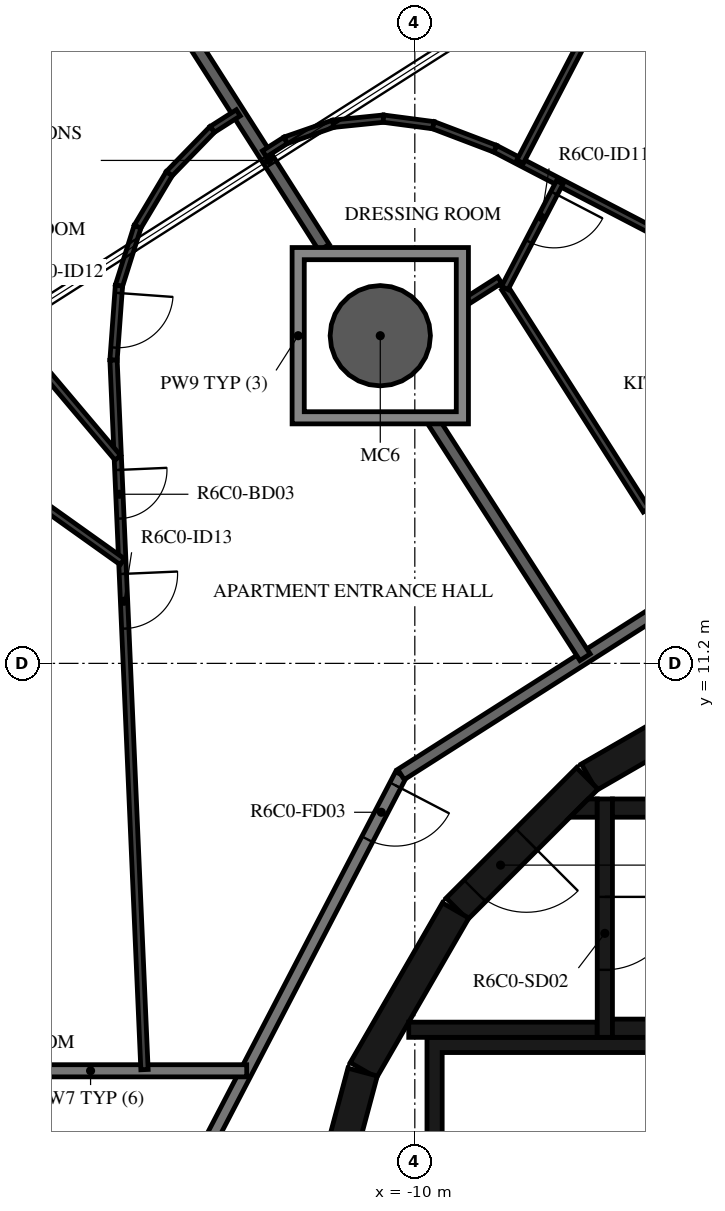
"""IFC4 building model, lengths in metres.
Left out: names, types, materials, properties, quantities, classifications, styles, units other than length and angle.
Written with IfcOpenShell. Run it as: python <this file> out.ifc"""

import sys

from ifc_helpers import new_model, si_unit, direction, frame, frame_2d, origin, origin_2d, place, context, subcontext, project, spatial, polyline, rectangle, hollow_circle, outline, extrude, element, fill, save


model = new_model("IFC4")
c1 = context("Model", 3, precision=1e-05, world=origin(), true_north=direction((0.0, 1.0)))
c2 = subcontext(c1, "Body", "Model", "MODEL_VIEW")
j1 = project(units=[si_unit("LENGTHUNIT", "METRE"), si_unit("PLANEANGLEUNIT", "RADIAN")], contexts=[c1])
p1 = place(None, origin())
s1 = spatial("IfcSite", under=j1, at=p1, CompositionType="ELEMENT")
p2 = place(p1, origin())
s2 = spatial("IfcBuilding", under=s1, at=p2, CompositionType="ELEMENT")
p3 = place(p2, frame((0.0, 0.0, 254.7)))
s3 = spatial("IfcBuildingStorey", under=s2, at=p3, CompositionType="ELEMENT", Elevation=254.7)
p4 = place(p3, frame((-10.568, 16.588, -0.38), z_axis=(0.0, 0.0, 1.0), x_axis=(1.0, 0.0, 0.0)))
e1 = element("IfcColumn", 1, at=p4, inside=s3, PredefinedType="COLUMN", context=c2, shape_type="SweptSolid", body=[
    extrude(hollow_circle(Radius=0.825, WallThickness=0.04, at=origin_2d()), origin(), (0.0, 0.0, 1.0), 2.616),
])
p5 = place(p3, frame((-4.51, 10.845, 0.0), z_axis=(0.0, 0.0, 1.0), x_axis=(-0.865975092491, -0.500087131594, 0.0)))
e2 = element("IfcWall", 2, at=p5, inside=s3, PredefinedType="SHEAR", context=c2, shape_type="SweptSolid", body=[
    extrude(rectangle(XDim=3.033, YDim=0.5, at=frame_2d((1.516, 0.0))), origin(), (0.0, 0.0, 1.0), 3.05),
])
p6 = place(p3, frame((-7.164, 9.308, 0.0), z_axis=(0.0, 0.0, 1.0), x_axis=(-0.707106781187, -0.707106781187, 0.0)))
e3 = element("IfcWall", 3, at=p6, inside=s3, PredefinedType="SHEAR", context=c2, shape_type="SweptSolid", body=[
    extrude(rectangle(XDim=3.032, YDim=0.5, at=frame_2d((1.516, 0.0))), origin(), (0.0, 0.0, 1.0), 3.05),
])
p7 = place(p6, frame((1.416, 0.0, 0.0)))
e4 = element("IfcOpeningElement", 4, at=p7, cuts=e3, PredefinedType="OPENING", context=c2, shape_type="SweptSolid", body=[
    extrude(rectangle(XDim=1.2, YDim=2.1, at=frame_2d((0.6, 1.05))), frame((0.0, 0.26, 0.0), z_axis=(0.0, -1.0, 0.0), x_axis=(1.0, 0.0, 0.0)), (0.0, 0.0, 1.0), 0.52),
])
for number, where, z_axis, x_axis in (
    (5, (-9.329, 7.137, 0.0), (0.0, 0.0, 1.0), (-0.5, -0.866, 0.0)),
    (6, (-10.858, 4.479, 0.0), (0.0, 0.0, 1.0), (-0.259, -0.966, 0.0)),
):
    element("IfcWall", number, at=place(p3, frame(where, z_axis=z_axis, x_axis=x_axis)), inside=s3, PredefinedType="SHEAR", context=c2, shape_type="SweptSolid", body=[
        extrude(rectangle(XDim=3.033, YDim=0.5, at=frame_2d((1.516, 0.0))), origin(), (0.0, 0.0, 1.0), 3.05),
    ])
for number, where, z_axis, x_axis in (
    (7, (-6.75, 5.2, 0.0), (0.0, 0.0, 1.0), (1.0, 0.0, 0.0)),
    (8, (-6.75, 8.82, 0.0), (0.0, 0.0, 1.0), (1.0, 0.0, 0.0)),
):
    element("IfcWall", number, at=place(p3, frame(where, z_axis=z_axis, x_axis=x_axis)), inside=s3, PredefinedType="SHEAR", context=c2, shape_type="SweptSolid", body=[
        extrude(rectangle(XDim=6.75, YDim=0.3, at=frame_2d((3.375, 0.0))), origin(), (0.0, 0.0, 1.0), 3.05),
    ])
p8 = place(p3, frame((-6.875, 8.97, 0.0), z_axis=(0.0, 0.0, 1.0), x_axis=(0.0, -1.0, 0.0)))
e9 = element("IfcWall", 9, at=p8, inside=s3, PredefinedType="SHEAR", context=c2, shape_type="SweptSolid", body=[
    extrude(rectangle(XDim=3.92, YDim=0.25, at=frame_2d((1.96, 0.0))), origin(), (0.0, 0.0, 1.0), 3.05),
])
p9 = place(p8, frame((1.61, 0.0, 0.0)))
e10 = element("IfcOpeningElement", 10, at=p9, cuts=e9, PredefinedType="OPENING", context=c2, shape_type="SweptSolid", body=[
    extrude(rectangle(XDim=1.2, YDim=2.1, at=frame_2d((0.6, 1.05))), frame((0.0, 0.135, 0.0), z_axis=(0.0, -1.0, 0.0), x_axis=(1.0, 0.0, 0.0)), (0.0, 0.0, 1.0), 0.27),
])
p10 = place(p3, frame((-7.0, 5.175, 0.0), z_axis=(0.0, 0.0, 1.0), x_axis=(-1.0, 0.0, 0.0)))
e11 = element("IfcWall", 11, at=p10, inside=s3, PredefinedType="SHEAR", context=c2, shape_type="SweptSolid", body=[
    extrude(rectangle(XDim=3.1, YDim=0.25, at=frame_2d((1.55, 0.0))), origin(), (0.0, 0.0, 1.0), 3.05),
])
p11 = place(p3, origin())
e12 = element("IfcWall", 12, at=p11, inside=s3, PredefinedType="SHEAR", context=c2, shape_type="SweptSolid", body=[
    extrude(outline(polyline([(-7.148, 8.97), (-7.0, 8.97), (-7.0, 8.67), (-7.448, 8.67), (-7.148, 8.97)])), origin(), (0.0, 0.0, 1.0), 3.05),
])
p12 = place(p3, origin())
e13 = element("IfcWall", 13, at=p12, inside=s3, PredefinedType="SHEAR", context=c2, shape_type="SweptSolid", body=[
    extrude(outline(polyline([(-9.55, 4.8), (-1.2, 4.8), (-1.2, 1.9), (-0.95, 1.9), (-0.95, 4.8), (0.95, 4.8), (0.95, 1.9), (1.2, 1.9), (1.2, 4.8), (3.1, 4.8), (3.1, 1.9), (3.35, 1.9), (3.35, 4.8), (5.25, 4.8), (5.25, 1.9), (5.5, 1.9), (5.5, 4.8), (7.4, 4.8), (7.4, 1.9), (7.65, 1.9), (7.65, 4.8), (9.55, 4.8), (9.55, 1.9), (9.8, 1.9), (9.8, 4.8), (9.8, 5.05), (-9.8, 5.05), (-9.8, 4.8), (-9.8, 1.9), (-9.55, 1.9), (-9.55, 4.8)])), origin(), (0.0, 0.0, 1.0), 3.05),
])
p13 = place(p3, frame((-10.228, 9.372, 0.0), z_axis=(0.0, 0.0, 1.0), x_axis=(-0.461759464021, -0.887005184532, 0.0)))
e14 = element("IfcWall", 14, at=p13, inside=s3, PredefinedType="STANDARD", context=c2, shape_type="SweptSolid", body=[
    extrude(rectangle(XDim=7.181, YDim=0.2, at=frame_2d((3.591, 0.0))), origin(), (0.0, 0.0, 1.0), 3.05),
])
p14 = place(p13, frame((0.2, 0.0, 0.0)))
e15 = element("IfcOpeningElement", 15, at=p14, cuts=e14, PredefinedType="OPENING", context=c2, shape_type="SweptSolid", body=[
    extrude(rectangle(XDim=1.0, YDim=2.1, at=frame_2d((0.5, 1.05))), frame((0.0, 0.11, 0.0), z_axis=(0.0, -1.0, 0.0), x_axis=(1.0, 0.0, 0.0)), (0.0, 0.0, 1.0), 0.22),
])
p15 = place(p3, frame((-4.172, 13.231, 0.0), z_axis=(0.0, 0.0, 1.0), x_axis=(-0.843388394728, -0.537304397561, 0.0)))
e16 = element("IfcWall", 16, at=p15, inside=s3, PredefinedType="STANDARD", context=c2, shape_type="SweptSolid", body=[
    extrude(rectangle(XDim=7.181, YDim=0.2, at=frame_2d((3.59, 0.0))), origin(), (0.0, 0.0, 1.0), 3.05),
])
p16 = place(p3, frame((-12.764, 4.5, 0.0), z_axis=(0.0, 0.0, 1.0), x_axis=(-1.0, 0.0, 0.0)))
e17 = element("IfcWall", 17, at=p16, inside=s3, PredefinedType="STANDARD", context=c2, shape_type="SweptSolid", body=[
    extrude(rectangle(XDim=5.135, YDim=0.2, at=frame_2d((2.568, 0.0))), origin(), (0.0, 0.0, 1.0), 3.05),
])
p17 = place(p3, frame((-9.69, 15.171, 0.0), z_axis=(0.0, 0.0, 1.0), x_axis=(0.540961372678, -0.841047438181, 0.0)))
e18 = element("IfcWall", 18, at=p17, inside=s3, PredefinedType="STANDARD", context=c2, shape_type="SweptSolid", body=[
    extrude(rectangle(XDim=4.602, YDim=0.2, at=frame_2d((2.301, 0.0))), origin(), (0.0, 0.0, 1.0), 3.05),
])
p18 = place(p3, frame((-14.837, 23.29, 0.0), z_axis=(0.0, 0.0, 1.0), x_axis=(0.537316863221, -0.843380452998, 0.0)))
e19 = element("IfcWall", 19, at=p18, inside=s3, PredefinedType="STANDARD", context=c2, shape_type="SweptSolid", body=[
    extrude(rectangle(XDim=6.227, YDim=0.2, at=frame_2d((3.113, 0.0))), origin(), (0.0, 0.0, 1.0), 3.05),
])
p19 = place(p3, frame((-4.888, 14.553, 0.0), z_axis=(0.0, 0.0, 1.0), x_axis=(-0.843349608892, -0.537365273517, 0.0)))
e20 = element("IfcWall", 20, at=p19, inside=s3, PredefinedType="PARTITIONING", context=c2, shape_type="SweptSolid", body=[
    extrude(rectangle(XDim=1.548, YDim=0.12, at=frame_2d((0.774, 0.0))), origin(), (0.0, 0.0, 1.0), 3.05),
])
p20 = place(p19, frame((0.2, 0.0, 0.0)))
e21 = element("IfcOpeningElement", 21, at=p20, cuts=e20, PredefinedType="OPENING", context=c2, shape_type="SweptSolid", body=[
    extrude(rectangle(XDim=0.9, YDim=2.1, at=frame_2d((0.45, 1.05))), frame((0.0, 0.07, 0.0), z_axis=(0.0, -1.0, 0.0), x_axis=(1.0, 0.0, 0.0)), (0.0, 0.0, 1.0), 0.14),
])
p21 = place(p3, frame((-6.194, 13.721, 0.0), z_axis=(0.0, 0.0, 1.0), x_axis=(-0.537316807294, 0.843380488629, 0.0)))
e22 = element("IfcWall", 22, at=p21, inside=s3, PredefinedType="PARTITIONING", context=c2, shape_type="SweptSolid", body=[
    extrude(rectangle(XDim=4.331, YDim=0.12, at=frame_2d((2.165, 0.0))), origin(), (0.0, 0.0, 1.0), 3.05),
])
p22 = place(p3, frame((-8.604, 17.504, 0.0), z_axis=(0.0, 0.0, 1.0), x_axis=(-0.843265746233, -0.537496866251, 0.0)))
e23 = element("IfcWall", 23, at=p22, inside=s3, PredefinedType="PARTITIONING", context=c2, shape_type="SweptSolid", body=[
    extrude(rectangle(XDim=0.61, YDim=0.12, at=frame_2d((0.305, 0.0))), origin(), (0.0, 0.0, 1.0), 3.05),
])
p23 = place(p3, frame((0.41, 14.932, 0.0), z_axis=(0.0, 0.0, 1.0), x_axis=(-0.887012293034, 0.461745808867, 0.0)))
e24 = element("IfcWall", 24, at=p23, inside=s3, PredefinedType="PARTITIONING", context=c2, shape_type="SweptSolid", body=[
    extrude(rectangle(XDim=10.246, YDim=0.12, at=frame_2d((5.123, 0.0))), origin(), (0.0, 0.0, 1.0), 3.05),
])
p24 = place(p23, frame((4.725, 0.0, 0.0)))
e25 = element("IfcOpeningElement", 25, at=p24, cuts=e24, PredefinedType="OPENING", context=c2, shape_type="SweptSolid", body=[
    extrude(rectangle(XDim=0.9, YDim=2.1, at=frame_2d((0.45, 1.05))), frame((0.0, 0.07, 0.0), z_axis=(0.0, -1.0, 0.0), x_axis=(1.0, 0.0, 0.0)), (0.0, 0.0, 1.0), 0.14),
])
p25 = place(p3, frame((-6.237, 23.353, 0.0), z_axis=(0.0, 0.0, 1.0), x_axis=(-0.461714347673, -0.88702866986, 0.0)))
e26 = element("IfcWall", 26, at=p25, inside=s3, PredefinedType="PARTITIONING", context=c2, shape_type="SweptSolid", body=[
    extrude(rectangle(XDim=4.4, YDim=0.12, at=frame_2d((2.2, 0.0))), origin(), (0.0, 0.0, 1.0), 3.05),
])
p26 = place(p25, frame((0.2, 0.0, 0.0)))
e27 = element("IfcOpeningElement", 27, at=p26, cuts=e26, PredefinedType="OPENING", context=c2, shape_type="SweptSolid", body=[
    extrude(rectangle(XDim=0.9, YDim=2.1, at=frame_2d((0.45, 1.05))), frame((0.0, 0.07, 0.0), z_axis=(0.0, -1.0, 0.0), x_axis=(1.0, 0.0, 0.0)), (0.0, 0.0, 1.0), 0.14),
])
p27 = place(p3, frame((-7.616, 19.11, 0.0), z_axis=(0.0, 0.0, 1.0), x_axis=(-0.461764840073, -0.887002385832, 0.0)))
e28 = element("IfcWall", 28, at=p27, inside=s3, PredefinedType="PARTITIONING", context=c2, shape_type="SweptSolid", body=[
    extrude(rectangle(XDim=1.958, YDim=0.12, at=frame_2d((0.979, 0.0))), origin(), (0.0, 0.0, 1.0), 3.05),
])
p28 = place(p27, frame((0.2, 0.0, 0.0)))
e29 = element("IfcOpeningElement", 29, at=p28, cuts=e28, PredefinedType="OPENING", context=c2, shape_type="SweptSolid", body=[
    extrude(rectangle(XDim=0.9, YDim=2.1, at=frame_2d((0.45, 1.05))), frame((0.0, 0.07, 0.0), z_axis=(0.0, -1.0, 0.0), x_axis=(1.0, 0.0, 0.0)), (0.0, 0.0, 1.0), 0.14),
])
p29 = place(p3, frame((-12.473, 19.579, 0.0), z_axis=(0.0, 0.0, 1.0), x_axis=(0.843467404643, 0.537180358264, 0.0)))
e30 = element("IfcWall", 30, at=p29, inside=s3, PredefinedType="PARTITIONING", context=c2, shape_type="SweptSolid", body=[
    extrude(rectangle(XDim=0.415, YDim=0.12, at=frame_2d((0.207, 0.0))), origin(), (0.0, 0.0, 1.0), 3.05),
])
for number, where, z_axis, x_axis in (
    (31, (-12.124, 19.802, 0.0), (0.0, 0.0, 1.0), (0.945, 0.328, 0.0)),
    (32, (-11.341, 20.074, 0.0), (0.0, 0.0, 1.0), (0.995, 0.102, 0.0)),
    (33, (-10.516, 20.158, 0.0), (0.0, 0.0, 1.0), (0.991, -0.131, 0.0)),
):
    element("IfcWall", number, at=place(p3, frame(where, z_axis=z_axis, x_axis=x_axis)), inside=s3, PredefinedType="PARTITIONING", context=c2, shape_type="SweptSolid", body=[
        extrude(rectangle(XDim=0.829, YDim=0.12, at=frame_2d((0.415, 0.0))), origin(), (0.0, 0.0, 1.0), 3.05),
    ])
p30 = place(p3, frame((-9.694, 20.05, 0.0), z_axis=(0.0, 0.0, 1.0), x_axis=(0.934647766222, -0.35557496129, 0.0)))
e34 = element("IfcWall", 34, at=p30, inside=s3, PredefinedType="PARTITIONING", context=c2, shape_type="SweptSolid", body=[
    extrude(rectangle(XDim=1.087, YDim=0.12, at=frame_2d((0.543, 0.0))), origin(), (0.0, 0.0, 1.0), 3.05),
])
p31 = place(p3, frame((-12.903, 20.254, 0.0), z_axis=(0.0, 0.0, 1.0), x_axis=(-0.843404143432, -0.537279676557, 0.0)))
e35 = element("IfcWall", 35, at=p31, inside=s3, PredefinedType="PARTITIONING", context=c2, shape_type="SweptSolid", body=[
    extrude(rectangle(XDim=0.508, YDim=0.12, at=frame_2d((0.254, 0.0))), origin(), (0.0, 0.0, 1.0), 3.05),
])
for number, where, z_axis, x_axis in (
    (36, (-13.332, 19.981, 0.0), (0.0, 0.0, 1.0), (-0.697, -0.717, 0.0)),
    (37, (-14.039, 19.252, 0.0), (0.0, 0.0, 1.0), (-0.513, -0.859, 0.0)),
    (38, (-14.56, 18.38, 0.0), (0.0, 0.0, 1.0), (-0.301, -0.954, 0.0)),
):
    element("IfcWall", number, at=place(p3, frame(where, z_axis=z_axis, x_axis=x_axis)), inside=s3, PredefinedType="PARTITIONING", context=c2, shape_type="SweptSolid", body=[
        extrude(rectangle(XDim=1.016, YDim=0.12, at=frame_2d((0.508, 0.0))), origin(), (0.0, 0.0, 1.0), 3.05),
    ])
p32 = place(p3, frame((-14.865, 17.411, 0.0), z_axis=(0.0, 0.0, 1.0), x_axis=(-0.072618457011, -0.997359794508, 0.0)))
e39 = element("IfcWall", 39, at=p32, inside=s3, PredefinedType="PARTITIONING", context=c2, shape_type="SweptSolid", body=[
    extrude(rectangle(XDim=1.227, YDim=0.12, at=frame_2d((0.614, 0.0))), origin(), (0.0, 0.0, 1.0), 3.05),
])
p33 = place(p32, frame((0.12, 0.0, 0.0)))
e40 = element("IfcOpeningElement", 40, at=p33, cuts=e39, PredefinedType="OPENING", context=c2, shape_type="SweptSolid", body=[
    extrude(rectangle(XDim=0.9, YDim=2.1, at=frame_2d((0.45, 1.05))), frame((0.0, 0.07, 0.0), z_axis=(0.0, -1.0, 0.0), x_axis=(1.0, 0.0, 0.0)), (0.0, 0.0, 1.0), 0.14),
])
p34 = place(p3, frame((-14.955, 16.187, 0.0), z_axis=(0.0, 0.0, 1.0), x_axis=(0.04360777668, -0.999048728448, 0.0)))
e41 = element("IfcWall", 41, at=p34, inside=s3, PredefinedType="PARTITIONING", context=c2, shape_type="SweptSolid", body=[
    extrude(rectangle(XDim=11.679, YDim=0.12, at=frame_2d((5.839, 0.0))), origin(), (0.0, 0.0, 1.0), 3.05),
])
p35 = place(p34, frame((1.808, 0.0, 0.0)))
e42 = element("IfcOpeningElement", 42, at=p35, cuts=e41, PredefinedType="OPENING", context=c2, shape_type="SweptSolid", body=[
    extrude(rectangle(XDim=0.8, YDim=2.1, at=frame_2d((0.4, 1.05))), frame((0.0, 0.07, 0.0), z_axis=(0.0, -1.0, 0.0), x_axis=(1.0, 0.0, 0.0)), (0.0, 0.0, 1.0), 0.14),
])
p36 = place(p34, frame((3.519, 0.0, 0.0)))
e43 = element("IfcOpeningElement", 43, at=p36, cuts=e41, PredefinedType="OPENING", context=c2, shape_type="SweptSolid", body=[
    extrude(rectangle(XDim=0.9, YDim=2.1, at=frame_2d((0.45, 1.05))), frame((0.0, 0.07, 0.0), z_axis=(0.0, -1.0, 0.0), x_axis=(1.0, 0.0, 0.0)), (0.0, 0.0, 1.0), 0.14),
])
p37 = place(p3, frame((-18.269, 18.589, 0.0), z_axis=(0.0, 0.0, 1.0), x_axis=(0.645124067673, -0.764077834588, 0.0)))
e44 = element("IfcWall", 44, at=p37, inside=s3, PredefinedType="PARTITIONING", context=c2, shape_type="SweptSolid", body=[
    extrude(rectangle(XDim=5.246, YDim=0.12, at=frame_2d((2.623, 0.0))), origin(), (0.0, 0.0, 1.0), 3.05),
])
p38 = place(p3, frame((-18.529, 15.522, 0.0), z_axis=(0.0, 0.0, 1.0), x_axis=(0.814350646776, -0.580373176582, 0.0)))
e45 = element("IfcWall", 45, at=p38, inside=s3, PredefinedType="PARTITIONING", context=c2, shape_type="SweptSolid", body=[
    extrude(rectangle(XDim=4.567, YDim=0.12, at=frame_2d((2.284, 0.0))), origin(), (0.0, 0.0, 1.0), 3.05),
])
p39 = place(p3, origin())
e46 = element("IfcWall", 46, at=p39, inside=s3, PredefinedType="STANDARD", context=c2, shape_type="SweptSolid", body=[
    extrude(outline(polyline([(-9.118, 18.038), (-9.118, 15.138), (-12.018, 15.138), (-12.018, 18.038), (-9.118, 18.038)]), holes=[polyline([(-11.818, 15.338), (-9.318, 15.338), (-9.318, 17.838), (-11.818, 17.838), (-11.818, 15.338)])]), origin(), (0.0, 0.0, 1.0), 3.05),
])
p40 = place(p9, origin())
e47 = element("IfcDoor", 47, at=p40, inside=s3, OperationType="SINGLE_SWING_LEFT", PredefinedType="DOOR", context=c2, shape_type="SweptSolid", body=[
    extrude(rectangle(XDim=1.2, YDim=2.1, at=frame_2d((0.6, 1.05))), frame((0.0, 0.025, 0.0), z_axis=(0.0, -1.0, 0.0), x_axis=(1.0, 0.0, 0.0)), (0.0, 0.0, 1.0), 0.05),
])
fill(e10, e47)
p41 = place(p7, origin())
e48 = element("IfcDoor", 48, at=p41, inside=s3, OperationType="SINGLE_SWING_RIGHT", PredefinedType="DOOR", context=c2, shape_type="SweptSolid", body=[
    extrude(rectangle(XDim=1.2, YDim=2.1, at=frame_2d((0.6, 1.05))), frame((0.0, 0.025, 0.0), z_axis=(0.0, -1.0, 0.0), x_axis=(1.0, 0.0, 0.0)), (0.0, 0.0, 1.0), 0.05),
])
fill(e4, e48)
p42 = place(p28, origin())
e49 = element("IfcDoor", 49, at=p42, inside=s3, OperationType="SINGLE_SWING_RIGHT", PredefinedType="DOOR", context=c2, shape_type="SweptSolid", body=[
    extrude(rectangle(XDim=0.9, YDim=2.1, at=frame_2d((0.45, 1.05))), frame((0.0, 0.025, 0.0), z_axis=(0.0, -1.0, 0.0), x_axis=(1.0, 0.0, 0.0)), (0.0, 0.0, 1.0), 0.05),
])
fill(e29, e49)
p43 = place(p14, origin())
e50 = element("IfcDoor", 50, at=p43, inside=s3, OperationType="SINGLE_SWING_LEFT", PredefinedType="DOOR", context=c2, shape_type="SweptSolid", body=[
    extrude(rectangle(XDim=1.0, YDim=2.1, at=frame_2d((0.5, 1.05))), frame((0.0, 0.025, 0.0), z_axis=(0.0, -1.0, 0.0), x_axis=(1.0, 0.0, 0.0)), (0.0, 0.0, 1.0), 0.05),
])
fill(e15, e50)
p44 = place(p33, origin())
e51 = element("IfcDoor", 51, at=p44, inside=s3, OperationType="SINGLE_SWING_LEFT", PredefinedType="DOOR", context=c2, shape_type="SweptSolid", body=[
    extrude(rectangle(XDim=0.9, YDim=2.1, at=frame_2d((0.45, 1.05))), frame((0.0, 0.025, 0.0), z_axis=(0.0, -1.0, 0.0), x_axis=(1.0, 0.0, 0.0)), (0.0, 0.0, 1.0), 0.05),
])
fill(e40, e51)
p45 = place(p35, origin())
e52 = element("IfcDoor", 52, at=p45, inside=s3, OperationType="SINGLE_SWING_LEFT", PredefinedType="DOOR", context=c2, shape_type="SweptSolid", body=[
    extrude(rectangle(XDim=0.8, YDim=2.1, at=frame_2d((0.4, 1.05))), frame((0.0, 0.025, 0.0), z_axis=(0.0, -1.0, 0.0), x_axis=(1.0, 0.0, 0.0)), (0.0, 0.0, 1.0), 0.05),
])
fill(e42, e52)
p46 = place(p36, origin())
e53 = element("IfcDoor", 53, at=p46, inside=s3, OperationType="SINGLE_SWING_LEFT", PredefinedType="DOOR", context=c2, shape_type="SweptSolid", body=[
    extrude(rectangle(XDim=0.9, YDim=2.1, at=frame_2d((0.45, 1.05))), frame((0.0, 0.025, 0.0), z_axis=(0.0, -1.0, 0.0), x_axis=(1.0, 0.0, 0.0)), (0.0, 0.0, 1.0), 0.05),
])
fill(e43, e53)
save(model, sys.argv[1])
